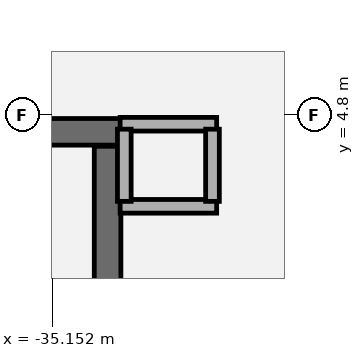
"""IFC4 building model, lengths in metres.
Left out: names, types, materials, properties, quantities, classifications, styles, units other than length and angle.
Written with IfcOpenShell. Run it as: python <this file> out.ifc"""

import sys

from ifc_helpers import new_model, si_unit, direction, frame, frame_2d, origin, place, context, subcontext, project, spatial, rectangle, extrude, element, save


model = new_model("IFC4")
c1 = context("Model", 3, precision=1e-05, world=origin(), true_north=direction((0.0, 1.0)))
c2 = subcontext(c1, "Body", "Model", "MODEL_VIEW")
j1 = project(units=[si_unit("LENGTHUNIT", "METRE"), si_unit("PLANEANGLEUNIT", "RADIAN")], contexts=[c1])
p1 = place(None, origin())
s1 = spatial("IfcSite", under=j1, at=p1, CompositionType="ELEMENT")
p2 = place(p1, origin())
s2 = spatial("IfcBuilding", under=s1, at=p2, CompositionType="ELEMENT")
p3 = place(p2, frame((0.0, 0.0, -5.4)))
s3 = spatial("IfcBuildingStorey", under=s2, at=p3, CompositionType="ELEMENT", Elevation=-5.4)
p4 = place(p3, frame((-13.635, 37.094, 0.0), z_axis=(0.0, 0.0, 1.0), x_axis=(-0.842602364841, -0.538536214905, 0.0)))
e1 = element("IfcWall", 1, at=p4, inside=s3, PredefinedType="USERDEFINED", context=c2, shape_type="SweptSolid", body=[
    extrude(rectangle(XDim=60.27, YDim=0.55, at=frame_2d((30.135, 0.0))), origin(), (0.0, 0.0, 1.0), 4.3),
])
p5 = place(p3, frame((-34.25, 4.575, 0.0), z_axis=(0.0, 0.0, 1.0), x_axis=(-1.0, 0.0, 0.0)))
e2 = element("IfcWall", 2, at=p5, inside=s3, PredefinedType="SHEAR", context=c2, shape_type="SweptSolid", body=[
    extrude(rectangle(XDim=4.21, YDim=0.35, at=frame_2d((2.105, 0.0))), origin(), (0.0, 0.0, 1.0), 5.1),
])
p6 = place(p3, frame((-34.425, -4.385, 0.0), z_axis=(0.0, 0.0, 1.0), x_axis=(0.0, 1.0, 0.0)))
e3 = element("IfcWall", 3, at=p6, inside=s3, PredefinedType="SHEAR", context=c2, shape_type="SweptSolid", body=[
    extrude(rectangle(XDim=8.77, YDim=0.35, at=frame_2d((4.385, 0.0))), origin(), (0.0, 0.0, 1.0), 5.1),
])
for number, where, z_axis, x_axis in (
    (4, (-32.99, 3.595, 0.0), (0.0, 0.0, 1.0), (-1.0, 0.0, 0.0)),
    (5, (-34.26, 4.675, 0.0), (0.0, 0.0, 1.0), (1.0, 0.0, 0.0)),
):
    element("IfcWall", number, at=place(p3, frame(where, z_axis=z_axis, x_axis=x_axis)), inside=s3, PredefinedType="PARTITIONING", context=c2, shape_type="SweptSolid", body=[
        extrude(rectangle(XDim=1.27, YDim=0.18, at=frame_2d((0.635, 0.0))), origin(), (0.0, 0.0, 1.0), 5.1),
    ])
for number, where, z_axis, x_axis in (
    (6, (-34.205, 3.66, 0.0), (0.0, 0.0, 1.0), (0.0, 1.0, 0.0)),
    (7, (-33.045, 4.61, 0.0), (0.0, 0.0, 1.0), (0.0, -1.0, 0.0)),
):
    element("IfcWall", number, at=place(p3, frame(where, z_axis=z_axis, x_axis=x_axis)), inside=s3, PredefinedType="PARTITIONING", context=c2, shape_type="SweptSolid", body=[
        extrude(rectangle(XDim=0.95, YDim=0.18, at=frame_2d((0.475, 0.0))), origin(), (0.0, 0.0, 1.0), 5.1),
    ])
save(model, sys.argv[1])
